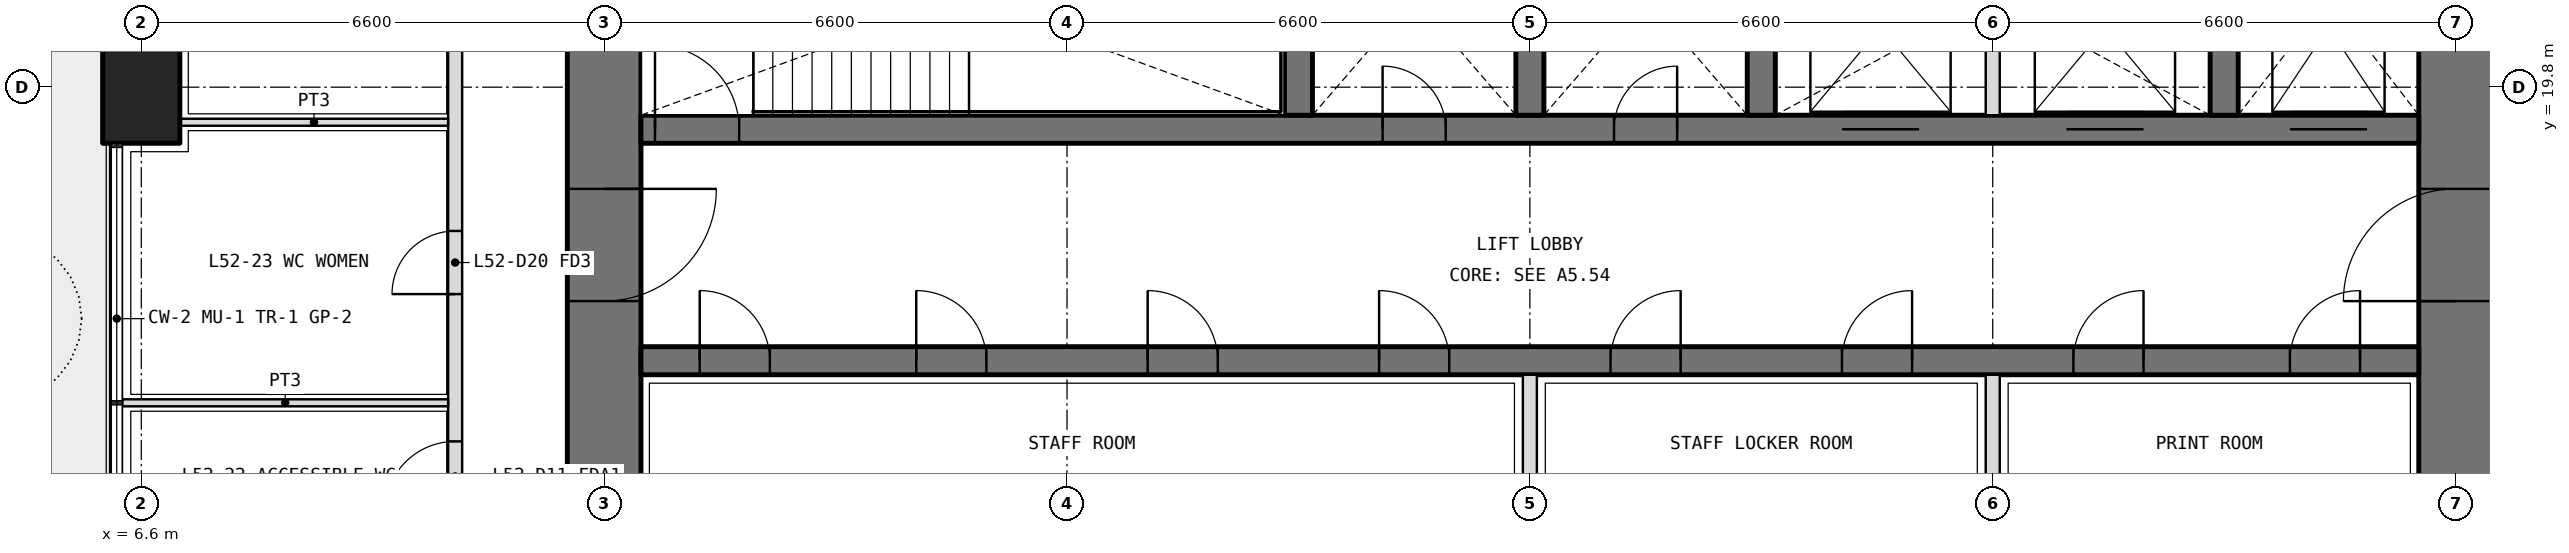
"""IFC4 building model, lengths in metres.
Left out: names, types, materials, properties, quantities, classifications, styles, units other than length and angle.
Written with IfcOpenShell. Run it as: python <this file> out.ifc"""

import sys

from ifc_helpers import new_model, si_unit, direction, frame, frame_2d, origin, origin_2d, place, context, subcontext, project, spatial, rectangle, extrude, element, fill, save


model = new_model("IFC4")
c1 = context("Model", 3, precision=1e-05, world=origin(), true_north=direction((0.0, 1.0)))
c2 = subcontext(c1, "Body", "Model", "MODEL_VIEW")
j1 = project(units=[si_unit("LENGTHUNIT", "METRE"), si_unit("PLANEANGLEUNIT", "RADIAN")], contexts=[c1])
p1 = place(None, origin())
s1 = spatial("IfcSite", under=j1, at=p1, CompositionType="ELEMENT")
p2 = place(p1, origin())
s2 = spatial("IfcBuilding", under=s1, at=p2, CompositionType="ELEMENT")
p3 = place(p2, frame((0.0, 0.0, 229.2)))
s3 = spatial("IfcBuildingStorey", under=s2, at=p3, CompositionType="ELEMENT", Elevation=229.2)
p4 = place(p3, frame((6.6, 19.8, 0.0), z_axis=(0.0, 0.0, 1.0), x_axis=(0.0, 1.0, 0.0)))
e1 = element("IfcColumn", 1, at=p4, inside=s3, PredefinedType="COLUMN", context=c2, shape_type="SweptSolid", body=[
    extrude(rectangle(XDim=1.6, YDim=1.1, at=origin_2d()), origin(), (0.0, 0.0, 1.0), 4.2),
])
p5 = place(p3, frame((39.6, 13.725, 0.0), z_axis=(0.0, 0.0, 1.0), x_axis=(0.0, 1.0, 0.0)))
e2 = element("IfcWall", 2, at=p5, inside=s3, PredefinedType="SHEAR", context=c2, shape_type="SweptSolid", body=[
    extrude(rectangle(XDim=18.75, YDim=1.05, at=frame_2d((9.375, 0.0))), origin(), (0.0, 0.0, 1.0), 4.2),
])
p6 = place(p5, frame((3.025, 0.0, 0.0)))
e3 = element("IfcOpeningElement", 3, at=p6, cuts=e2, PredefinedType="OPENING", context=c2, shape_type="SweptSolid", body=[
    extrude(rectangle(XDim=1.6, YDim=2.1, at=frame_2d((0.8, 1.05))), frame((0.0, 0.535, 0.0), z_axis=(0.0, -1.0, 0.0), x_axis=(1.0, 0.0, 0.0)), (0.0, 0.0, 1.0), 1.07),
])
p7 = place(p5, frame((13.825, 0.0, 0.0)))
e4 = element("IfcOpeningElement", 4, at=p7, cuts=e2, PredefinedType="OPENING", context=c2, shape_type="SweptSolid", body=[
    extrude(rectangle(XDim=1.6, YDim=2.1, at=frame_2d((0.8, 1.05))), frame((0.0, 0.535, 0.0), z_axis=(0.0, -1.0, 0.0), x_axis=(1.0, 0.0, 0.0)), (0.0, 0.0, 1.0), 1.07),
])
p8 = place(p3, frame((13.2, 32.475, 0.0), z_axis=(0.0, 0.0, 1.0), x_axis=(0.0, -1.0, 0.0)))
e5 = element("IfcWall", 5, at=p8, inside=s3, PredefinedType="SHEAR", context=c2, shape_type="SweptSolid", body=[
    extrude(rectangle(XDim=18.75, YDim=1.05, at=frame_2d((9.375, 0.0))), origin(), (0.0, 0.0, 1.0), 4.2),
])
p9 = place(p8, frame((14.125, 0.0, 0.0)))
e6 = element("IfcOpeningElement", 6, at=p9, cuts=e5, PredefinedType="OPENING", context=c2, shape_type="SweptSolid", body=[
    extrude(rectangle(XDim=1.6, YDim=2.1, at=frame_2d((0.8, 1.05))), frame((0.0, 0.535, 0.0), z_axis=(0.0, -1.0, 0.0), x_axis=(1.0, 0.0, 0.0)), (0.0, 0.0, 1.0), 1.07),
])
p10 = place(p8, frame((3.325, 0.0, 0.0)))
e7 = element("IfcOpeningElement", 7, at=p10, cuts=e5, PredefinedType="OPENING", context=c2, shape_type="SweptSolid", body=[
    extrude(rectangle(XDim=1.6, YDim=2.1, at=frame_2d((0.8, 1.05))), frame((0.0, 0.535, 0.0), z_axis=(0.0, -1.0, 0.0), x_axis=(1.0, 0.0, 0.0)), (0.0, 0.0, 1.0), 1.07),
])
p11 = place(p3, frame((13.725, 15.9, 0.0), z_axis=(0.0, 0.0, 1.0), x_axis=(1.0, 0.0, 0.0)))
e8 = element("IfcWall", 8, at=p11, inside=s3, PredefinedType="SHEAR", context=c2, shape_type="SweptSolid", body=[
    extrude(rectangle(XDim=25.35, YDim=0.4, at=frame_2d((12.675, 0.0))), origin(), (0.0, 0.0, 1.0), 4.2),
])
p12 = place(p11, frame((0.837, 0.0, 0.0)))
e9 = element("IfcOpeningElement", 9, at=p12, cuts=e8, PredefinedType="OPENING", context=c2, shape_type="SweptSolid", body=[
    extrude(rectangle(XDim=1.0, YDim=2.1, at=frame_2d((0.5, 1.05))), frame((0.0, 0.21, 0.0), z_axis=(0.0, -1.0, 0.0), x_axis=(1.0, 0.0, 0.0)), (0.0, 0.0, 1.0), 0.42),
])
p13 = place(p11, frame((3.925, 0.0, 0.0)))
e10 = element("IfcOpeningElement", 10, at=p13, cuts=e8, PredefinedType="OPENING", context=c2, shape_type="SweptSolid", body=[
    extrude(rectangle(XDim=1.0, YDim=2.1, at=frame_2d((0.5, 1.05))), frame((0.0, 0.21, 0.0), z_axis=(0.0, -1.0, 0.0), x_axis=(1.0, 0.0, 0.0)), (0.0, 0.0, 1.0), 0.42),
])
p14 = place(p11, frame((7.225, 0.0, 0.0)))
e11 = element("IfcOpeningElement", 11, at=p14, cuts=e8, PredefinedType="OPENING", context=c2, shape_type="SweptSolid", body=[
    extrude(rectangle(XDim=1.0, YDim=2.1, at=frame_2d((0.5, 1.05))), frame((0.0, 0.21, 0.0), z_axis=(0.0, -1.0, 0.0), x_axis=(1.0, 0.0, 0.0)), (0.0, 0.0, 1.0), 0.42),
])
p15 = place(p11, frame((10.525, 0.0, 0.0)))
e12 = element("IfcOpeningElement", 12, at=p15, cuts=e8, PredefinedType="OPENING", context=c2, shape_type="SweptSolid", body=[
    extrude(rectangle(XDim=1.0, YDim=2.1, at=frame_2d((0.5, 1.05))), frame((0.0, 0.21, 0.0), z_axis=(0.0, -1.0, 0.0), x_axis=(1.0, 0.0, 0.0)), (0.0, 0.0, 1.0), 0.42),
])
p16 = place(p11, frame((13.825, 0.0, 0.0)))
e13 = element("IfcOpeningElement", 13, at=p16, cuts=e8, PredefinedType="OPENING", context=c2, shape_type="SweptSolid", body=[
    extrude(rectangle(XDim=1.0, YDim=2.1, at=frame_2d((0.5, 1.05))), frame((0.0, 0.21, 0.0), z_axis=(0.0, -1.0, 0.0), x_axis=(1.0, 0.0, 0.0)), (0.0, 0.0, 1.0), 0.42),
])
p17 = place(p11, frame((17.125, 0.0, 0.0)))
e14 = element("IfcOpeningElement", 14, at=p17, cuts=e8, PredefinedType="OPENING", context=c2, shape_type="SweptSolid", body=[
    extrude(rectangle(XDim=1.0, YDim=2.1, at=frame_2d((0.5, 1.05))), frame((0.0, 0.21, 0.0), z_axis=(0.0, -1.0, 0.0), x_axis=(1.0, 0.0, 0.0)), (0.0, 0.0, 1.0), 0.42),
])
p18 = place(p11, frame((20.425, 0.0, 0.0)))
e15 = element("IfcOpeningElement", 15, at=p18, cuts=e8, PredefinedType="OPENING", context=c2, shape_type="SweptSolid", body=[
    extrude(rectangle(XDim=1.0, YDim=2.1, at=frame_2d((0.5, 1.05))), frame((0.0, 0.21, 0.0), z_axis=(0.0, -1.0, 0.0), x_axis=(1.0, 0.0, 0.0)), (0.0, 0.0, 1.0), 0.42),
])
p19 = place(p11, frame((23.512, 0.0, 0.0)))
e16 = element("IfcOpeningElement", 16, at=p19, cuts=e8, PredefinedType="OPENING", context=c2, shape_type="SweptSolid", body=[
    extrude(rectangle(XDim=1.0, YDim=2.1, at=frame_2d((0.5, 1.05))), frame((0.0, 0.21, 0.0), z_axis=(0.0, -1.0, 0.0), x_axis=(1.0, 0.0, 0.0)), (0.0, 0.0, 1.0), 0.42),
])
p20 = place(p3, frame((13.725, 19.2, 0.0), z_axis=(0.0, 0.0, 1.0), x_axis=(1.0, 0.0, 0.0)))
e17 = element("IfcWall", 17, at=p20, inside=s3, PredefinedType="SHEAR", context=c2, shape_type="SweptSolid", body=[
    extrude(rectangle(XDim=25.35, YDim=0.4, at=frame_2d((12.675, 0.0))), origin(), (0.0, 0.0, 1.0), 4.2),
])
p21 = place(p20, frame((10.575, 0.0, 0.0)))
e18 = element("IfcOpeningElement", 18, at=p21, cuts=e17, PredefinedType="OPENING", context=c2, shape_type="SweptSolid", body=[
    extrude(rectangle(XDim=0.9, YDim=2.1, at=frame_2d((0.45, 1.05))), frame((0.0, 0.21, 0.0), z_axis=(0.0, -1.0, 0.0), x_axis=(1.0, 0.0, 0.0)), (0.0, 0.0, 1.0), 0.42),
])
p22 = place(p20, frame((13.875, 0.0, 0.0)))
e19 = element("IfcOpeningElement", 19, at=p22, cuts=e17, PredefinedType="OPENING", context=c2, shape_type="SweptSolid", body=[
    extrude(rectangle(XDim=0.9, YDim=2.1, at=frame_2d((0.45, 1.05))), frame((0.0, 0.21, 0.0), z_axis=(0.0, -1.0, 0.0), x_axis=(1.0, 0.0, 0.0)), (0.0, 0.0, 1.0), 0.42),
])
p23 = place(p20, frame((0.2, 0.0, 0.0)))
e20 = element("IfcOpeningElement", 20, at=p23, cuts=e17, PredefinedType="OPENING", context=c2, shape_type="SweptSolid", body=[
    extrude(rectangle(XDim=1.2, YDim=2.1, at=frame_2d((0.6, 1.05))), frame((0.0, 0.21, 0.0), z_axis=(0.0, -1.0, 0.0), x_axis=(1.0, 0.0, 0.0)), (0.0, 0.0, 1.0), 0.42),
])
p24 = place(p20, frame((23.512, 0.0, 0.0)))
e21 = element("IfcOpeningElement", 21, at=p24, cuts=e17, PredefinedType="OPENING", context=c2, shape_type="SweptSolid", body=[
    extrude(rectangle(XDim=1.1, YDim=2.1, at=frame_2d((0.55, 1.05))), frame((0.0, 0.21, 0.0), z_axis=(0.0, -1.0, 0.0), x_axis=(1.0, 0.0, 0.0)), (0.0, 0.0, 1.0), 0.42),
])
p25 = place(p20, frame((17.125, 0.0, 0.0)))
e22 = element("IfcOpeningElement", 22, at=p25, cuts=e17, PredefinedType="OPENING", context=c2, shape_type="SweptSolid", body=[
    extrude(rectangle(XDim=1.1, YDim=2.1, at=frame_2d((0.55, 1.05))), frame((0.0, 0.21, 0.0), z_axis=(0.0, -1.0, 0.0), x_axis=(1.0, 0.0, 0.0)), (0.0, 0.0, 1.0), 0.42),
])
p26 = place(p20, frame((20.325, 0.0, 0.0)))
e23 = element("IfcOpeningElement", 23, at=p26, cuts=e17, PredefinedType="OPENING", context=c2, shape_type="SweptSolid", body=[
    extrude(rectangle(XDim=1.1, YDim=2.1, at=frame_2d((0.55, 1.05))), frame((0.0, 0.21, 0.0), z_axis=(0.0, -1.0, 0.0), x_axis=(1.0, 0.0, 0.0)), (0.0, 0.0, 1.0), 0.42),
])
for number, where, z_axis, x_axis in (
    (24, (23.1, 19.4, 0.0), (0.0, 0.0, 1.0), (0.0, 1.0, 0.0)),
    (25, (26.4, 19.4, 0.0), (0.0, 0.0, 1.0), (0.0, 1.0, 0.0)),
    (26, (29.7, 19.4, 0.0), (0.0, 0.0, 1.0), (0.0, 1.0, 0.0)),
    (27, (36.3, 19.4, 0.0), (0.0, 0.0, 1.0), (0.0, 1.0, 0.0)),
):
    element("IfcWall", number, at=place(p3, frame(where, z_axis=z_axis, x_axis=x_axis)), inside=s3, PredefinedType="SHEAR", context=c2, shape_type="SweptSolid", body=[
        extrude(rectangle(XDim=3.35, YDim=0.4, at=frame_2d((1.675, 0.0))), origin(), (0.0, 0.0, 1.0), 4.2),
    ])
for number, where, z_axis, x_axis in (
    (28, (26.4, 13.725, 0.0), (0.0, 0.0, 1.0), (0.0, 1.0, 0.0)),
    (29, (33.0, 13.725, 0.0), (0.0, 0.0, 1.0), (0.0, 1.0, 0.0)),
):
    element("IfcWall", number, at=place(p3, frame(where, z_axis=z_axis, x_axis=x_axis)), inside=s3, PredefinedType="PARTITIONING", context=c2, shape_type="SweptSolid", body=[
        extrude(rectangle(XDim=1.975, YDim=0.2, at=frame_2d((0.987, 0.0))), origin(), (0.0, 0.0, 1.0), 4.2),
    ])
p27 = place(p3, frame((33.0, 19.4, 0.0), z_axis=(0.0, 0.0, 1.0), x_axis=(0.0, 1.0, 0.0)))
e30 = element("IfcWall", 30, at=p27, inside=s3, PredefinedType="PARTITIONING", context=c2, shape_type="SweptSolid", body=[
    extrude(rectangle(XDim=3.35, YDim=0.2, at=frame_2d((1.675, 0.0))), origin(), (0.0, 0.0, 1.0), 4.2),
])
p28 = place(p3, frame((11.075, 7.4, 0.0), z_axis=(0.0, 0.0, 1.0), x_axis=(0.0, 1.0, 0.0)))
e31 = element("IfcWall", 31, at=p28, inside=s3, PredefinedType="PARTITIONING", context=c2, shape_type="SweptSolid", body=[
    extrude(rectangle(XDim=31.4, YDim=0.2, at=frame_2d((15.7, 0.0))), origin(), (0.0, 0.0, 1.0), 3.0),
])
p29 = place(p28, frame((2.35, 0.0, 0.0)))
e32 = element("IfcOpeningElement", 32, at=p29, cuts=e31, PredefinedType="OPENING", context=c2, shape_type="SweptSolid", body=[
    extrude(rectangle(XDim=1.0, YDim=2.1, at=frame_2d((0.5, 1.05))), frame((0.0, 0.11, 0.0), z_axis=(0.0, -1.0, 0.0), x_axis=(1.0, 0.0, 0.0)), (0.0, 0.0, 1.0), 0.22),
])
p30 = place(p28, frame((6.35, 0.0, 0.0)))
e33 = element("IfcOpeningElement", 33, at=p30, cuts=e31, PredefinedType="OPENING", context=c2, shape_type="SweptSolid", body=[
    extrude(rectangle(XDim=1.0, YDim=2.1, at=frame_2d((0.5, 1.05))), frame((0.0, 0.11, 0.0), z_axis=(0.0, -1.0, 0.0), x_axis=(1.0, 0.0, 0.0)), (0.0, 0.0, 1.0), 0.22),
])
p31 = place(p28, frame((9.45, 0.0, 0.0)))
e34 = element("IfcOpeningElement", 34, at=p31, cuts=e31, PredefinedType="OPENING", context=c2, shape_type="SweptSolid", body=[
    extrude(rectangle(XDim=0.9, YDim=2.1, at=frame_2d((0.45, 1.05))), frame((0.0, 0.11, 0.0), z_axis=(0.0, -1.0, 0.0), x_axis=(1.0, 0.0, 0.0)), (0.0, 0.0, 1.0), 0.22),
])
p32 = place(p28, frame((13.35, 0.0, 0.0)))
e35 = element("IfcOpeningElement", 35, at=p32, cuts=e31, PredefinedType="OPENING", context=c2, shape_type="SweptSolid", body=[
    extrude(rectangle(XDim=0.9, YDim=2.1, at=frame_2d((0.45, 1.05))), frame((0.0, 0.11, 0.0), z_axis=(0.0, -1.0, 0.0), x_axis=(1.0, 0.0, 0.0)), (0.0, 0.0, 1.0), 0.22),
])
p33 = place(p28, frame((16.85, 0.0, 0.0)))
e36 = element("IfcOpeningElement", 36, at=p33, cuts=e31, PredefinedType="OPENING", context=c2, shape_type="SweptSolid", body=[
    extrude(rectangle(XDim=1.0, YDim=2.1, at=frame_2d((0.5, 1.05))), frame((0.0, 0.11, 0.0), z_axis=(0.0, -1.0, 0.0), x_axis=(1.0, 0.0, 0.0)), (0.0, 0.0, 1.0), 0.22),
])
p34 = place(p28, frame((21.8, 0.0, 0.0)))
e37 = element("IfcOpeningElement", 37, at=p34, cuts=e31, PredefinedType="OPENING", context=c2, shape_type="SweptSolid", body=[
    extrude(rectangle(XDim=1.0, YDim=2.1, at=frame_2d((0.5, 1.05))), frame((0.0, 0.11, 0.0), z_axis=(0.0, -1.0, 0.0), x_axis=(1.0, 0.0, 0.0)), (0.0, 0.0, 1.0), 0.22),
])
p35 = place(p28, frame((28.05, 0.0, 0.0)))
e38 = element("IfcOpeningElement", 38, at=p35, cuts=e31, PredefinedType="OPENING", context=c2, shape_type="SweptSolid", body=[
    extrude(rectangle(XDim=1.0, YDim=2.1, at=frame_2d((0.5, 1.05))), frame((0.0, 0.11, 0.0), z_axis=(0.0, -1.0, 0.0), x_axis=(1.0, 0.0, 0.0)), (0.0, 0.0, 1.0), 0.22),
])
p36 = place(p3, frame((6.33, 15.3, 0.0), z_axis=(0.0, 0.0, 1.0), x_axis=(1.0, 0.0, 0.0)))
e39 = element("IfcWall", 39, at=p36, inside=s3, PredefinedType="PARTITIONING", context=c2, shape_type="SweptSolid", body=[
    extrude(rectangle(XDim=4.645, YDim=0.1, at=frame_2d((2.323, 0.0))), origin(), (0.0, 0.0, 1.0), 2.7),
])
p37 = place(p3, frame((7.15, 19.3, 0.0), z_axis=(0.0, 0.0, 1.0), x_axis=(1.0, 0.0, 0.0)))
e40 = element("IfcWall", 40, at=p37, inside=s3, PredefinedType="PARTITIONING", context=c2, shape_type="SweptSolid", body=[
    extrude(rectangle(XDim=3.825, YDim=0.1, at=frame_2d((1.913, 0.0))), origin(), (0.0, 0.0, 1.0), 3.0),
])
p38 = place(p30, origin())
e41 = element("IfcDoor", 41, at=p38, inside=s3, OperationType="SINGLE_SWING_LEFT", PredefinedType="DOOR", context=c2, shape_type="SweptSolid", body=[
    extrude(rectangle(XDim=1.0, YDim=2.1, at=frame_2d((0.5, 1.05))), frame((0.0, 0.025, 0.0), z_axis=(0.0, -1.0, 0.0), x_axis=(1.0, 0.0, 0.0)), (0.0, 0.0, 1.0), 0.05),
])
fill(e33, e41)
p39 = place(p31, origin())
e42 = element("IfcDoor", 42, at=p39, inside=s3, OperationType="SINGLE_SWING_LEFT", PredefinedType="DOOR", context=c2, shape_type="SweptSolid", body=[
    extrude(rectangle(XDim=0.9, YDim=2.1, at=frame_2d((0.45, 1.05))), frame((0.0, 0.025, 0.0), z_axis=(0.0, -1.0, 0.0), x_axis=(1.0, 0.0, 0.0)), (0.0, 0.0, 1.0), 0.05),
])
fill(e34, e42)
p40 = place(p21, origin())
e43 = element("IfcDoor", 43, at=p40, inside=s3, OperationType="SINGLE_SWING_LEFT", PredefinedType="DOOR", context=c2, shape_type="SweptSolid", body=[
    extrude(rectangle(XDim=0.9, YDim=2.1, at=frame_2d((0.45, 1.05))), frame((0.0, 0.025, 0.0), z_axis=(0.0, -1.0, 0.0), x_axis=(1.0, 0.0, 0.0)), (0.0, 0.0, 1.0), 0.05),
])
fill(e18, e43)
p41 = place(p22, origin())
e44 = element("IfcDoor", 44, at=p41, inside=s3, OperationType="SINGLE_SWING_RIGHT", PredefinedType="DOOR", context=c2, shape_type="SweptSolid", body=[
    extrude(rectangle(XDim=0.9, YDim=2.1, at=frame_2d((0.45, 1.05))), frame((0.0, 0.025, 0.0), z_axis=(0.0, -1.0, 0.0), x_axis=(1.0, 0.0, 0.0)), (0.0, 0.0, 1.0), 0.05),
])
fill(e19, e44)
p42 = place(p12, origin())
e45 = element("IfcDoor", 45, at=p42, inside=s3, OperationType="SINGLE_SWING_LEFT", PredefinedType="DOOR", context=c2, shape_type="SweptSolid", body=[
    extrude(rectangle(XDim=1.0, YDim=2.1, at=frame_2d((0.5, 1.05))), frame((0.0, 0.025, 0.0), z_axis=(0.0, -1.0, 0.0), x_axis=(1.0, 0.0, 0.0)), (0.0, 0.0, 1.0), 0.05),
])
fill(e9, e45)
p43 = place(p13, origin())
e46 = element("IfcDoor", 46, at=p43, inside=s3, OperationType="SINGLE_SWING_LEFT", PredefinedType="DOOR", context=c2, shape_type="SweptSolid", body=[
    extrude(rectangle(XDim=1.0, YDim=2.1, at=frame_2d((0.5, 1.05))), frame((0.0, 0.025, 0.0), z_axis=(0.0, -1.0, 0.0), x_axis=(1.0, 0.0, 0.0)), (0.0, 0.0, 1.0), 0.05),
])
fill(e10, e46)
p44 = place(p14, origin())
e47 = element("IfcDoor", 47, at=p44, inside=s3, OperationType="SINGLE_SWING_LEFT", PredefinedType="DOOR", context=c2, shape_type="SweptSolid", body=[
    extrude(rectangle(XDim=1.0, YDim=2.1, at=frame_2d((0.5, 1.05))), frame((0.0, 0.025, 0.0), z_axis=(0.0, -1.0, 0.0), x_axis=(1.0, 0.0, 0.0)), (0.0, 0.0, 1.0), 0.05),
])
fill(e11, e47)
p45 = place(p15, origin())
e48 = element("IfcDoor", 48, at=p45, inside=s3, OperationType="SINGLE_SWING_LEFT", PredefinedType="DOOR", context=c2, shape_type="SweptSolid", body=[
    extrude(rectangle(XDim=1.0, YDim=2.1, at=frame_2d((0.5, 1.05))), frame((0.0, 0.025, 0.0), z_axis=(0.0, -1.0, 0.0), x_axis=(1.0, 0.0, 0.0)), (0.0, 0.0, 1.0), 0.05),
])
fill(e12, e48)
p46 = place(p16, origin())
e49 = element("IfcDoor", 49, at=p46, inside=s3, OperationType="SINGLE_SWING_RIGHT", PredefinedType="DOOR", context=c2, shape_type="SweptSolid", body=[
    extrude(rectangle(XDim=1.0, YDim=2.1, at=frame_2d((0.5, 1.05))), frame((0.0, 0.025, 0.0), z_axis=(0.0, -1.0, 0.0), x_axis=(1.0, 0.0, 0.0)), (0.0, 0.0, 1.0), 0.05),
])
fill(e13, e49)
p47 = place(p17, origin())
e50 = element("IfcDoor", 50, at=p47, inside=s3, OperationType="SINGLE_SWING_RIGHT", PredefinedType="DOOR", context=c2, shape_type="SweptSolid", body=[
    extrude(rectangle(XDim=1.0, YDim=2.1, at=frame_2d((0.5, 1.05))), frame((0.0, 0.025, 0.0), z_axis=(0.0, -1.0, 0.0), x_axis=(1.0, 0.0, 0.0)), (0.0, 0.0, 1.0), 0.05),
])
fill(e14, e50)
p48 = place(p18, origin())
e51 = element("IfcDoor", 51, at=p48, inside=s3, OperationType="SINGLE_SWING_RIGHT", PredefinedType="DOOR", context=c2, shape_type="SweptSolid", body=[
    extrude(rectangle(XDim=1.0, YDim=2.1, at=frame_2d((0.5, 1.05))), frame((0.0, 0.025, 0.0), z_axis=(0.0, -1.0, 0.0), x_axis=(1.0, 0.0, 0.0)), (0.0, 0.0, 1.0), 0.05),
])
fill(e15, e51)
p49 = place(p19, origin())
e52 = element("IfcDoor", 52, at=p49, inside=s3, OperationType="SINGLE_SWING_RIGHT", PredefinedType="DOOR", context=c2, shape_type="SweptSolid", body=[
    extrude(rectangle(XDim=1.0, YDim=2.1, at=frame_2d((0.5, 1.05))), frame((0.0, 0.025, 0.0), z_axis=(0.0, -1.0, 0.0), x_axis=(1.0, 0.0, 0.0)), (0.0, 0.0, 1.0), 0.05),
])
fill(e16, e52)
p50 = place(p23, origin())
e53 = element("IfcDoor", 53, at=p50, inside=s3, OperationType="SINGLE_SWING_LEFT", PredefinedType="DOOR", context=c2, shape_type="SweptSolid", body=[
    extrude(rectangle(XDim=1.2, YDim=2.1, at=frame_2d((0.6, 1.05))), frame((0.0, 0.025, 0.0), z_axis=(0.0, -1.0, 0.0), x_axis=(1.0, 0.0, 0.0)), (0.0, 0.0, 1.0), 0.05),
])
fill(e20, e53)
p51 = place(p9, origin())
e54 = element("IfcDoor", 54, at=p51, inside=s3, OperationType="DOUBLE_DOOR_DOUBLE_SWING", PredefinedType="DOOR", context=c2, shape_type="SweptSolid", body=[
    extrude(rectangle(XDim=1.6, YDim=2.1, at=frame_2d((0.8, 1.05))), frame((0.0, 0.025, 0.0), z_axis=(0.0, -1.0, 0.0), x_axis=(1.0, 0.0, 0.0)), (0.0, 0.0, 1.0), 0.05),
])
fill(e6, e54)
p52 = place(p6, origin())
e55 = element("IfcDoor", 55, at=p52, inside=s3, OperationType="DOUBLE_DOOR_DOUBLE_SWING", PredefinedType="DOOR", context=c2, shape_type="SweptSolid", body=[
    extrude(rectangle(XDim=1.6, YDim=2.1, at=frame_2d((0.8, 1.05))), frame((0.0, 0.025, 0.0), z_axis=(0.0, -1.0, 0.0), x_axis=(1.0, 0.0, 0.0)), (0.0, 0.0, 1.0), 0.05),
])
fill(e3, e55)
p53 = place(p24, origin())
e56 = element("IfcDoor", 56, at=p53, inside=s3, OperationType="DOUBLE_DOOR_SLIDING", PredefinedType="DOOR", context=c2, shape_type="SweptSolid", body=[
    extrude(rectangle(XDim=1.1, YDim=2.1, at=frame_2d((0.55, 1.05))), frame((0.0, 0.025, 0.0), z_axis=(0.0, -1.0, 0.0), x_axis=(1.0, 0.0, 0.0)), (0.0, 0.0, 1.0), 0.05),
])
fill(e21, e56)
p54 = place(p25, origin())
e57 = element("IfcDoor", 57, at=p54, inside=s3, OperationType="DOUBLE_DOOR_SLIDING", PredefinedType="DOOR", context=c2, shape_type="SweptSolid", body=[
    extrude(rectangle(XDim=1.1, YDim=2.1, at=frame_2d((0.55, 1.05))), frame((0.0, 0.025, 0.0), z_axis=(0.0, -1.0, 0.0), x_axis=(1.0, 0.0, 0.0)), (0.0, 0.0, 1.0), 0.05),
])
fill(e22, e57)
p55 = place(p26, origin())
e58 = element("IfcDoor", 58, at=p55, inside=s3, OperationType="DOUBLE_DOOR_SLIDING", PredefinedType="DOOR", context=c2, shape_type="SweptSolid", body=[
    extrude(rectangle(XDim=1.1, YDim=2.1, at=frame_2d((0.55, 1.05))), frame((0.0, 0.025, 0.0), z_axis=(0.0, -1.0, 0.0), x_axis=(1.0, 0.0, 0.0)), (0.0, 0.0, 1.0), 0.05),
])
fill(e23, e58)
save(model, sys.argv[1])
